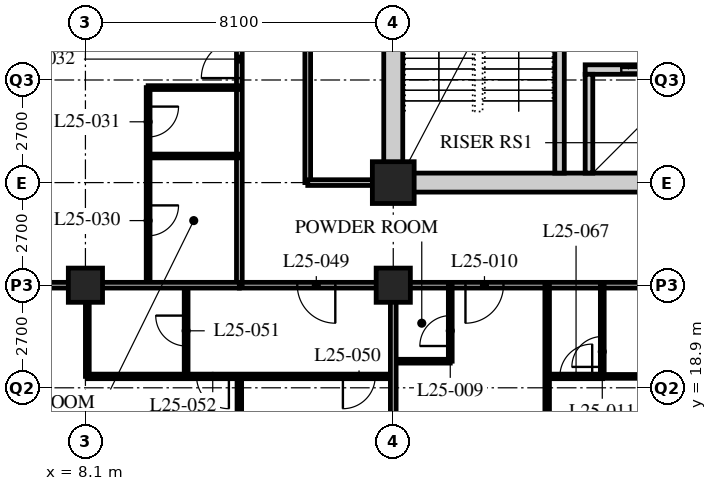
"""IFC4 building model, lengths in metres.
Left out: names, types, materials, properties, quantities, classifications, styles, units other than length and angle.
Written with IfcOpenShell. Run it as: python <this file> out.ifc"""

import sys

from ifc_helpers import new_model, si_unit, direction, frame, frame_2d, origin, origin_2d, place, context, subcontext, project, spatial, rectangle, hollow_rectangle, extrude, element, fill, save


model = new_model("IFC4")
c1 = context("Model", 3, precision=1e-05, world=origin(), true_north=direction((0.0, 1.0)))
c2 = subcontext(c1, "Body", "Model", "MODEL_VIEW")
j1 = project(units=[si_unit("LENGTHUNIT", "METRE"), si_unit("PLANEANGLEUNIT", "RADIAN")], contexts=[c1])
p1 = place(None, origin())
s1 = spatial("IfcSite", under=j1, at=p1, CompositionType="ELEMENT")
p2 = place(p1, origin())
s2 = spatial("IfcBuilding", under=s1, at=p2, CompositionType="ELEMENT")
p3 = place(p2, frame((0.0, 0.0, 103.4)))
s3 = spatial("IfcBuildingStorey", under=s2, at=p3, CompositionType="ELEMENT", Elevation=103.4)
for number, where, z_axis, x_axis in (
    (1, (8.1, 21.6, 0.0), (0.0, 0.0, 1.0), (1.0, 0.0, 0.0)),
    (2, (16.2, 21.6, 0.0), (0.0, 0.0, 1.0), (1.0, 0.0, 0.0)),
):
    element("IfcColumn", number, at=place(p3, frame(where, z_axis=z_axis, x_axis=x_axis)), inside=s3, PredefinedType="COLUMN", context=c2, shape_type="SweptSolid", body=[
        extrude(hollow_rectangle(XDim=0.9, YDim=0.9, WallThickness=0.1, at=origin_2d()), origin(), (0.0, 0.0, 1.0), 3.4),
    ])
p4 = place(p3, frame((16.2, 24.3, 0.0), z_axis=(0.0, 0.0, 1.0), x_axis=(1.0, 0.0, 0.0)))
e3 = element("IfcColumn", 3, at=p4, inside=s3, PredefinedType="COLUMN", context=c2, shape_type="SweptSolid", body=[
    extrude(hollow_rectangle(XDim=1.1, YDim=1.1, WallThickness=0.1, at=origin_2d()), origin(), (0.0, 0.0, 1.0), 3.4),
])
p5 = place(p3, frame((12.15, 21.6, 0.0), z_axis=(0.0, 0.0, 1.0), x_axis=(1.0, 0.0, 0.0)))
e4 = element("IfcWall", 4, at=p5, inside=s3, PredefinedType="PARTITIONING", context=c2, shape_type="SweptSolid", body=[
    extrude(rectangle(XDim=32.4, YDim=0.15, at=frame_2d((16.2, 0.0))), origin(), (0.0, 0.0, 1.0), 2.578),
])
p6 = place(p5, frame((5.95, 0.0, 0.0)))
e5 = element("IfcOpeningElement", 5, at=p6, cuts=e4, PredefinedType="OPENING", context=c2, shape_type="SweptSolid", body=[
    extrude(rectangle(XDim=1.0, YDim=2.1, at=frame_2d((0.5, 1.05))), frame((0.0, 0.085, 0.0), z_axis=(0.0, -1.0, 0.0), x_axis=(1.0, 0.0, 0.0)), (0.0, 0.0, 1.0), 0.17),
])
p7 = place(p5, frame((14.05, 0.0, 0.0)))
e6 = element("IfcOpeningElement", 6, at=p7, cuts=e4, PredefinedType="OPENING", context=c2, shape_type="SweptSolid", body=[
    extrude(rectangle(XDim=1.0, YDim=2.1, at=frame_2d((0.5, 1.05))), frame((0.0, 0.085, 0.0), z_axis=(0.0, -1.0, 0.0), x_axis=(1.0, 0.0, 0.0)), (0.0, 0.0, 1.0), 0.17),
])
p8 = place(p5, frame((22.15, 0.0, 0.0)))
e7 = element("IfcOpeningElement", 7, at=p8, cuts=e4, PredefinedType="OPENING", context=c2, shape_type="SweptSolid", body=[
    extrude(rectangle(XDim=1.0, YDim=2.1, at=frame_2d((0.5, 1.05))), frame((0.0, 0.085, 0.0), z_axis=(0.0, -1.0, 0.0), x_axis=(1.0, 0.0, 0.0)), (0.0, 0.0, 1.0), 0.17),
])
p9 = place(p5, frame((1.525, 0.0, 0.0)))
e8 = element("IfcOpeningElement", 8, at=p9, cuts=e4, PredefinedType="OPENING", context=c2, shape_type="SweptSolid", body=[
    extrude(rectangle(XDim=1.0, YDim=2.1, at=frame_2d((0.5, 1.05))), frame((0.0, 0.085, 0.0), z_axis=(0.0, -1.0, 0.0), x_axis=(1.0, 0.0, 0.0)), (0.0, 0.0, 1.0), 0.17),
])
p10 = place(p5, frame((29.875, 0.0, 0.0)))
e9 = element("IfcOpeningElement", 9, at=p10, cuts=e4, PredefinedType="OPENING", context=c2, shape_type="SweptSolid", body=[
    extrude(rectangle(XDim=1.0, YDim=2.1, at=frame_2d((0.5, 1.05))), frame((0.0, 0.085, 0.0), z_axis=(0.0, -1.0, 0.0), x_axis=(1.0, 0.0, 0.0)), (0.0, 0.0, 1.0), 0.17),
])
p11 = place(p3, frame((12.15, 21.6, 0.0), z_axis=(0.0, 0.0, 1.0), x_axis=(0.0, 1.0, 0.0)))
e10 = element("IfcWall", 10, at=p11, inside=s3, PredefinedType="PARTITIONING", context=c2, shape_type="SweptSolid", body=[
    extrude(rectangle(XDim=24.3, YDim=0.15, at=frame_2d((12.15, 0.0))), origin(), (0.0, 0.0, 1.0), 3.19),
])
p12 = place(p11, frame((5.45, 0.0, 0.0)))
e11 = element("IfcOpeningElement", 11, at=p12, cuts=e10, PredefinedType="OPENING", context=c2, shape_type="SweptSolid", body=[
    extrude(rectangle(XDim=1.0, YDim=2.1, at=frame_2d((0.5, 1.05))), frame((0.0, 0.085, 0.0), z_axis=(0.0, -1.0, 0.0), x_axis=(1.0, 0.0, 0.0)), (0.0, 0.0, 1.0), 0.17),
])
p13 = place(p11, frame((13.55, 0.0, 0.0)))
e12 = element("IfcOpeningElement", 12, at=p13, cuts=e10, PredefinedType="OPENING", context=c2, shape_type="SweptSolid", body=[
    extrude(rectangle(XDim=1.0, YDim=2.1, at=frame_2d((0.5, 1.05))), frame((0.0, 0.085, 0.0), z_axis=(0.0, -1.0, 0.0), x_axis=(1.0, 0.0, 0.0)), (0.0, 0.0, 1.0), 0.17),
])
p14 = place(p11, frame((21.65, 0.0, 0.0)))
e13 = element("IfcOpeningElement", 13, at=p14, cuts=e10, PredefinedType="OPENING", context=c2, shape_type="SweptSolid", body=[
    extrude(rectangle(XDim=1.0, YDim=2.1, at=frame_2d((0.5, 1.05))), frame((0.0, 0.085, 0.0), z_axis=(0.0, -1.0, 0.0), x_axis=(1.0, 0.0, 0.0)), (0.0, 0.0, 1.0), 0.17),
])
p15 = place(p3, frame((13.95, 44.1, 0.0), z_axis=(0.0, 0.0, 1.0), x_axis=(0.0, -1.0, 0.0)))
e14 = element("IfcWall", 14, at=p15, inside=s3, PredefinedType="PARTITIONING", context=c2, shape_type="SweptSolid", body=[
    extrude(rectangle(XDim=19.8, YDim=0.15, at=frame_2d((9.9, 0.0))), origin(), (0.0, 0.0, 1.0), 3.19),
])
p16 = place(p15, frame((15.25, 0.0, 0.0)))
e15 = element("IfcOpeningElement", 15, at=p16, cuts=e14, PredefinedType="OPENING", context=c2, shape_type="SweptSolid", body=[
    extrude(rectangle(XDim=1.0, YDim=2.1, at=frame_2d((0.5, 1.05))), frame((0.0, 0.085, 0.0), z_axis=(0.0, -1.0, 0.0), x_axis=(1.0, 0.0, 0.0)), (0.0, 0.0, 1.0), 0.17),
])
p17 = place(p15, frame((7.15, 0.0, 0.0)))
e16 = element("IfcOpeningElement", 16, at=p17, cuts=e14, PredefinedType="OPENING", context=c2, shape_type="SweptSolid", body=[
    extrude(rectangle(XDim=1.0, YDim=2.1, at=frame_2d((0.5, 1.05))), frame((0.0, 0.085, 0.0), z_axis=(0.0, -1.0, 0.0), x_axis=(1.0, 0.0, 0.0)), (0.0, 0.0, 1.0), 0.17),
])
p18 = place(p3, frame((13.95, 24.3, 0.0), z_axis=(0.0, 0.0, 1.0), x_axis=(1.0, 0.0, 0.0)))
e17 = element("IfcWall", 17, at=p18, inside=s3, PredefinedType="PARTITIONING", context=c2, shape_type="SweptSolid", body=[
    extrude(rectangle(XDim=2.05, YDim=0.15, at=frame_2d((1.025, 0.0))), origin(), (0.0, 0.0, 1.0), 3.19),
])
p19 = place(p3, frame((16.2, 19.6, 0.0), z_axis=(0.0, 0.0, 1.0), x_axis=(1.0, 0.0, 0.0)))
e18 = element("IfcWall", 18, at=p19, inside=s3, PredefinedType="PARTITIONING", context=c2, shape_type="SweptSolid", body=[
    extrude(rectangle(XDim=1.5, YDim=0.1, at=frame_2d((0.75, 0.0))), origin(), (0.0, 0.0, 1.0), 3.19),
])
p20 = place(p3, frame((17.7, 21.6, 0.0), z_axis=(0.0, 0.0, 1.0), x_axis=(0.0, -1.0, 0.0)))
e19 = element("IfcWall", 19, at=p20, inside=s3, PredefinedType="PARTITIONING", context=c2, shape_type="SweptSolid", body=[
    extrude(rectangle(XDim=2.0, YDim=0.1, at=frame_2d((1.0, 0.0))), origin(), (0.0, 0.0, 1.0), 3.19),
])
p21 = place(p20, frame((0.8, 0.0, 0.0)))
e20 = element("IfcOpeningElement", 20, at=p21, cuts=e19, PredefinedType="OPENING", context=c2, shape_type="SweptSolid", body=[
    extrude(rectangle(XDim=0.8, YDim=2.1, at=frame_2d((0.4, 1.05))), frame((0.0, 0.06, 0.0), z_axis=(0.0, -1.0, 0.0), x_axis=(1.0, 0.0, 0.0)), (0.0, 0.0, 1.0), 0.12),
])
p22 = place(p3, frame((21.7, 19.2, 0.0), z_axis=(0.0, 0.0, 1.0), x_axis=(1.0, 0.0, 0.0)))
e21 = element("IfcWall", 21, at=p22, inside=s3, PredefinedType="PARTITIONING", context=c2, shape_type="SweptSolid", body=[
    extrude(rectangle(XDim=2.6, YDim=0.1, at=frame_2d((1.3, 0.0))), origin(), (0.0, 0.0, 1.0), 3.19),
])
p23 = place(p3, frame((21.7, 21.6, 0.0), z_axis=(0.0, 0.0, 1.0), x_axis=(0.0, -1.0, 0.0)))
e22 = element("IfcWall", 22, at=p23, inside=s3, PredefinedType="PARTITIONING", context=c2, shape_type="SweptSolid", body=[
    extrude(rectangle(XDim=2.4, YDim=0.1, at=frame_2d((1.2, 0.0))), origin(), (0.0, 0.0, 1.0), 3.19),
])
p24 = place(p23, frame((1.35, 0.0, 0.0)))
e23 = element("IfcOpeningElement", 23, at=p24, cuts=e22, PredefinedType="OPENING", context=c2, shape_type="SweptSolid", body=[
    extrude(rectangle(XDim=0.8, YDim=2.1, at=frame_2d((0.4, 1.05))), frame((0.0, 0.06, 0.0), z_axis=(0.0, -1.0, 0.0), x_axis=(1.0, 0.0, 0.0)), (0.0, 0.0, 1.0), 0.12),
])
p25 = place(p3, frame((20.25, 21.6, 0.0), z_axis=(0.0, 0.0, 1.0), x_axis=(0.0, -1.0, 0.0)))
e24 = element("IfcWall", 24, at=p25, inside=s3, PredefinedType="PARTITIONING", context=c2, shape_type="SweptSolid", body=[
    extrude(rectangle(XDim=15.9, YDim=0.12, at=frame_2d((7.95, 0.0))), origin(), (0.0, 0.0, 1.0), 3.19),
])
p26 = place(p25, frame((8.875, 0.0, 0.0)))
e25 = element("IfcOpeningElement", 25, at=p26, cuts=e24, PredefinedType="OPENING", context=c2, shape_type="SweptSolid", body=[
    extrude(rectangle(XDim=0.85, YDim=2.1, at=frame_2d((0.425, 1.05))), frame((0.0, 0.07, 0.0), z_axis=(0.0, -1.0, 0.0), x_axis=(1.0, 0.0, 0.0)), (0.0, 0.0, 1.0), 0.14),
])
p27 = place(p3, frame((9.75, 21.6, 0.0), z_axis=(0.0, 0.0, 1.0), x_axis=(0.0, 1.0, 0.0)))
e26 = element("IfcWall", 26, at=p27, inside=s3, PredefinedType="PARTITIONING", context=c2, shape_type="SweptSolid", body=[
    extrude(rectangle(XDim=5.2, YDim=0.1, at=frame_2d((2.6, 0.0))), origin(), (0.0, 0.0, 1.0), 3.19),
])
p28 = place(p27, frame((1.3, 0.0, 0.0)))
e27 = element("IfcOpeningElement", 27, at=p28, cuts=e26, PredefinedType="OPENING", context=c2, shape_type="SweptSolid", body=[
    extrude(rectangle(XDim=0.8, YDim=2.1, at=frame_2d((0.4, 1.05))), frame((0.0, 0.06, 0.0), z_axis=(0.0, -1.0, 0.0), x_axis=(1.0, 0.0, 0.0)), (0.0, 0.0, 1.0), 0.12),
])
p29 = place(p27, frame((3.9, 0.0, 0.0)))
e28 = element("IfcOpeningElement", 28, at=p29, cuts=e26, PredefinedType="OPENING", context=c2, shape_type="SweptSolid", body=[
    extrude(rectangle(XDim=0.8, YDim=2.1, at=frame_2d((0.4, 1.05))), frame((0.0, 0.06, 0.0), z_axis=(0.0, -1.0, 0.0), x_axis=(1.0, 0.0, 0.0)), (0.0, 0.0, 1.0), 0.12),
])
for number, where, z_axis, x_axis in (
    (29, (12.15, 25.0, 0.0), (0.0, 0.0, 1.0), (-1.0, 0.0, 0.0)),
    (30, (12.15, 26.8, 0.0), (0.0, 0.0, 1.0), (-1.0, 0.0, 0.0)),
):
    element("IfcWall", number, at=place(p3, frame(where, z_axis=z_axis, x_axis=x_axis)), inside=s3, PredefinedType="PARTITIONING", context=c2, shape_type="SweptSolid", body=[
        extrude(rectangle(XDim=2.4, YDim=0.1, at=frame_2d((1.2, 0.0))), origin(), (0.0, 0.0, 1.0), 3.19),
    ])
p30 = place(p3, frame((10.75, 21.6, 0.0), z_axis=(0.0, 0.0, 1.0), x_axis=(0.0, -1.0, 0.0)))
e31 = element("IfcWall", 31, at=p30, inside=s3, PredefinedType="PARTITIONING", context=c2, shape_type="SweptSolid", body=[
    extrude(rectangle(XDim=2.4, YDim=0.1, at=frame_2d((1.2, 0.0))), origin(), (0.0, 0.0, 1.0), 3.19),
])
p31 = place(p30, frame((0.8, 0.0, 0.0)))
e32 = element("IfcOpeningElement", 32, at=p31, cuts=e31, PredefinedType="OPENING", context=c2, shape_type="SweptSolid", body=[
    extrude(rectangle(XDim=0.8, YDim=2.1, at=frame_2d((0.4, 1.05))), frame((0.0, 0.06, 0.0), z_axis=(0.0, -1.0, 0.0), x_axis=(1.0, 0.0, 0.0)), (0.0, 0.0, 1.0), 0.12),
])
p32 = place(p3, frame((8.15, 21.6, 0.0), z_axis=(0.0, 0.0, 1.0), x_axis=(0.0, -1.0, 0.0)))
e33 = element("IfcWall", 33, at=p32, inside=s3, PredefinedType="PARTITIONING", context=c2, shape_type="SweptSolid", body=[
    extrude(rectangle(XDim=2.4, YDim=0.1, at=frame_2d((1.2, 0.0))), origin(), (0.0, 0.0, 1.0), 2.578),
])
p33 = place(p3, frame((8.15, 19.2, 0.0), z_axis=(0.0, 0.0, 1.0), x_axis=(1.0, 0.0, 0.0)))
e34 = element("IfcWall", 34, at=p33, inside=s3, PredefinedType="PARTITIONING", context=c2, shape_type="SweptSolid", body=[
    extrude(rectangle(XDim=8.05, YDim=0.12, at=frame_2d((4.025, 0.0))), origin(), (0.0, 0.0, 1.0), 3.19),
])
p34 = place(p33, frame((6.725, 0.0, 0.0)))
e35 = element("IfcOpeningElement", 35, at=p34, cuts=e34, PredefinedType="OPENING", context=c2, shape_type="SweptSolid", body=[
    extrude(rectangle(XDim=0.85, YDim=2.1, at=frame_2d((0.425, 1.05))), frame((0.0, 0.07, 0.0), z_axis=(0.0, -1.0, 0.0), x_axis=(1.0, 0.0, 0.0)), (0.0, 0.0, 1.0), 0.14),
])
p35 = place(p33, frame((2.875, 0.0, 0.0)))
e36 = element("IfcOpeningElement", 36, at=p35, cuts=e34, PredefinedType="OPENING", context=c2, shape_type="SweptSolid", body=[
    extrude(rectangle(XDim=0.85, YDim=2.1, at=frame_2d((0.425, 1.05))), frame((0.0, 0.07, 0.0), z_axis=(0.0, -1.0, 0.0), x_axis=(1.0, 0.0, 0.0)), (0.0, 0.0, 1.0), 0.14),
])
p36 = place(p3, frame((12.15, 19.2, 0.0), z_axis=(0.0, 0.0, 1.0), x_axis=(0.0, -1.0, 0.0)))
e37 = element("IfcWall", 37, at=p36, inside=s3, PredefinedType="PARTITIONING", context=c2, shape_type="SweptSolid", body=[
    extrude(rectangle(XDim=13.5, YDim=0.12, at=frame_2d((6.75, 0.0))), origin(), (0.0, 0.0, 1.0), 3.19),
])
p37 = place(p3, frame((0.3, 21.6, 0.0), z_axis=(0.0, 0.0, 1.0), x_axis=(1.0, 0.0, 0.0)))
e38 = element("IfcWall", 38, at=p37, inside=s3, PredefinedType="PARTITIONING", context=c2, shape_type="SweptSolid", body=[
    extrude(rectangle(XDim=11.85, YDim=0.15, at=frame_2d((5.925, 0.0))), origin(), (0.0, 0.0, 1.0), 2.578),
])
p38 = place(p3, frame((16.2, 21.6, 0.0), z_axis=(0.0, 0.0, 1.0), x_axis=(0.0, -1.0, 0.0)))
e39 = element("IfcWall", 39, at=p38, inside=s3, PredefinedType="PARTITIONING", context=c2, shape_type="SweptSolid", body=[
    extrude(rectangle(XDim=15.9, YDim=0.15, at=frame_2d((7.95, 0.0))), origin(), (0.0, 0.0, 1.0), 2.578),
])
p39 = place(p3, frame((21.71, 19.2, 0.0), z_axis=(0.0, 0.0, 1.0), x_axis=(-1.0, 0.0, 0.0)))
e40 = element("IfcWall", 40, at=p39, inside=s3, PredefinedType="PARTITIONING", context=c2, shape_type="SweptSolid", body=[
    extrude(rectangle(XDim=1.46, YDim=0.12, at=frame_2d((0.73, 0.0))), origin(), (0.0, 0.0, 1.0), 3.19),
])
p40 = place(p39, frame((0.275, 0.0, 0.0)))
e41 = element("IfcOpeningElement", 41, at=p40, cuts=e40, PredefinedType="OPENING", context=c2, shape_type="SweptSolid", body=[
    extrude(rectangle(XDim=0.85, YDim=2.1, at=frame_2d((0.425, 1.05))), frame((0.0, 0.07, 0.0), z_axis=(0.0, -1.0, 0.0), x_axis=(1.0, 0.0, 0.0)), (0.0, 0.0, 1.0), 0.14),
])
p41 = place(p3, frame((15.95, 24.3, 0.0), z_axis=(0.0, 0.0, 1.0), x_axis=(1.0, 0.0, 0.0)))
e42 = element("IfcWall", 42, at=p41, inside=s3, PredefinedType="SOLIDWALL", context=c2, shape_type="SweptSolid", body=[
    extrude(rectangle(XDim=24.8, YDim=0.5, at=frame_2d((12.4, 0.0))), origin(), (0.0, 0.0, 1.0), 2.54),
])
p42 = place(p41, frame((11.5, 0.0, 0.0)))
e43 = element("IfcOpeningElement", 43, at=p42, cuts=e42, PredefinedType="OPENING", context=c2, shape_type="SweptSolid", body=[
    extrude(rectangle(XDim=1.8, YDim=2.4, at=frame_2d((0.9, 1.2))), frame((0.0, 0.26, 0.0), z_axis=(0.0, -1.0, 0.0), x_axis=(1.0, 0.0, 0.0)), (0.0, 0.0, 1.0), 0.52),
])
p43 = place(p3, frame((16.2, 24.55, 0.0), z_axis=(0.0, 0.0, 1.0), x_axis=(0.0, 1.0, 0.0)))
e44 = element("IfcWall", 44, at=p43, inside=s3, PredefinedType="SOLIDWALL", context=c2, shape_type="SweptSolid", body=[
    extrude(rectangle(XDim=15.7, YDim=0.5, at=frame_2d((7.85, 0.0))), origin(), (0.0, 0.0, 1.0), 2.578),
])
p44 = place(p3, frame((20.575, 24.55, 0.0), z_axis=(0.0, 0.0, 1.0), x_axis=(0.0, 1.0, 0.0)))
e45 = element("IfcWall", 45, at=p44, inside=s3, PredefinedType="SOLIDWALL", context=c2, shape_type="SweptSolid", body=[
    extrude(rectangle(XDim=7.75, YDim=0.25, at=frame_2d((3.875, 0.0))), origin(), (0.0, 0.0, 1.0), 3.19),
])
p45 = place(p44, frame((6.2, 0.0, 0.0)))
e46 = element("IfcOpeningElement", 46, at=p45, cuts=e45, PredefinedType="OPENING", context=c2, shape_type="SweptSolid", body=[
    extrude(rectangle(XDim=1.2, YDim=2.1, at=frame_2d((0.6, 1.05))), frame((0.0, 0.135, 0.0), z_axis=(0.0, -1.0, 0.0), x_axis=(1.0, 0.0, 0.0)), (0.0, 0.0, 1.0), 0.27),
])
p46 = place(p3, frame((21.25, 27.275, 0.0), z_axis=(0.0, 0.0, 1.0), x_axis=(1.0, 0.0, 0.0)))
e47 = element("IfcWall", 47, at=p46, inside=s3, PredefinedType="SOLIDWALL", context=c2, shape_type="SweptSolid", body=[
    extrude(rectangle(XDim=2.95, YDim=0.25, at=frame_2d((1.475, 0.0))), origin(), (0.0, 0.0, 1.0), 3.19),
])
p47 = place(p46, frame((0.95, 0.0, 0.0)))
e48 = element("IfcOpeningElement", 48, at=p47, cuts=e47, PredefinedType="OPENING", context=c2, shape_type="SweptSolid", body=[
    extrude(rectangle(XDim=1.1, YDim=2.4, at=frame_2d((0.55, 1.2))), frame((0.0, 0.135, 0.0), z_axis=(0.0, -1.0, 0.0), x_axis=(1.0, 0.0, 0.0)), (0.0, 0.0, 1.0), 0.27),
])
p48 = place(p3, frame((21.35, 24.55, 0.0), z_axis=(0.0, 0.0, 1.0), x_axis=(0.0, 1.0, 0.0)))
e49 = element("IfcWall", 49, at=p48, inside=s3, PredefinedType="SOLIDWALL", context=c2, shape_type="SweptSolid", body=[
    extrude(rectangle(XDim=2.6, YDim=0.2, at=frame_2d((1.3, 0.0))), origin(), (0.0, 0.0, 1.0), 3.19),
])
p49 = place(p21, origin())
e50 = element("IfcDoor", 50, at=p49, inside=s3, OperationType="SINGLE_SWING_LEFT", PredefinedType="DOOR", context=c2, shape_type="SweptSolid", body=[
    extrude(rectangle(XDim=0.8, YDim=2.1, at=frame_2d((0.4, 1.05))), frame((0.0, 0.025, 0.0), z_axis=(0.0, -1.0, 0.0), x_axis=(1.0, 0.0, 0.0)), (0.0, 0.0, 1.0), 0.05),
])
fill(e20, e50)
p50 = place(p6, origin())
e51 = element("IfcDoor", 51, at=p50, inside=s3, OperationType="SINGLE_SWING_RIGHT", PredefinedType="DOOR", context=c2, shape_type="SweptSolid", body=[
    extrude(rectangle(XDim=1.0, YDim=2.1, at=frame_2d((0.5, 1.05))), frame((0.0, 0.025, 0.0), z_axis=(0.0, -1.0, 0.0), x_axis=(1.0, 0.0, 0.0)), (0.0, 0.0, 1.0), 0.05),
])
fill(e5, e51)
p51 = place(p24, origin())
e52 = element("IfcDoor", 52, at=p51, inside=s3, OperationType="SINGLE_SWING_LEFT", PredefinedType="DOOR", context=c2, shape_type="SweptSolid", body=[
    extrude(rectangle(XDim=0.8, YDim=2.1, at=frame_2d((0.4, 1.05))), frame((0.0, 0.025, 0.0), z_axis=(0.0, -1.0, 0.0), x_axis=(1.0, 0.0, 0.0)), (0.0, 0.0, 1.0), 0.05),
])
fill(e23, e52)
p52 = place(p28, origin())
e53 = element("IfcDoor", 53, at=p52, inside=s3, OperationType="SINGLE_SWING_LEFT", PredefinedType="DOOR", context=c2, shape_type="SweptSolid", body=[
    extrude(rectangle(XDim=0.8, YDim=2.1, at=frame_2d((0.4, 1.05))), frame((0.0, 0.025, 0.0), z_axis=(0.0, -1.0, 0.0), x_axis=(1.0, 0.0, 0.0)), (0.0, 0.0, 1.0), 0.05),
])
fill(e27, e53)
p53 = place(p29, origin())
e54 = element("IfcDoor", 54, at=p53, inside=s3, OperationType="SINGLE_SWING_LEFT", PredefinedType="DOOR", context=c2, shape_type="SweptSolid", body=[
    extrude(rectangle(XDim=0.8, YDim=2.1, at=frame_2d((0.4, 1.05))), frame((0.0, 0.025, 0.0), z_axis=(0.0, -1.0, 0.0), x_axis=(1.0, 0.0, 0.0)), (0.0, 0.0, 1.0), 0.05),
])
fill(e28, e54)
p54 = place(p12, origin())
e55 = element("IfcDoor", 55, at=p54, inside=s3, OperationType="SINGLE_SWING_LEFT", PredefinedType="DOOR", context=c2, shape_type="SweptSolid", body=[
    extrude(rectangle(XDim=1.0, YDim=2.1, at=frame_2d((0.5, 1.05))), frame((0.0, 0.025, 0.0), z_axis=(0.0, -1.0, 0.0), x_axis=(1.0, 0.0, 0.0)), (0.0, 0.0, 1.0), 0.05),
])
fill(e11, e55)
p55 = place(p9, origin())
e56 = element("IfcDoor", 56, at=p55, inside=s3, OperationType="SINGLE_SWING_LEFT", PredefinedType="DOOR", context=c2, shape_type="SweptSolid", body=[
    extrude(rectangle(XDim=1.0, YDim=2.1, at=frame_2d((0.5, 1.05))), frame((0.0, 0.025, 0.0), z_axis=(0.0, -1.0, 0.0), x_axis=(1.0, 0.0, 0.0)), (0.0, 0.0, 1.0), 0.05),
])
fill(e8, e56)
p56 = place(p34, origin())
e57 = element("IfcDoor", 57, at=p56, inside=s3, OperationType="SINGLE_SWING_RIGHT", PredefinedType="DOOR", context=c2, shape_type="SweptSolid", body=[
    extrude(rectangle(XDim=0.85, YDim=2.1, at=frame_2d((0.425, 1.05))), frame((0.0, 0.025, 0.0), z_axis=(0.0, -1.0, 0.0), x_axis=(1.0, 0.0, 0.0)), (0.0, 0.0, 1.0), 0.05),
])
fill(e35, e57)
p57 = place(p31, origin())
e58 = element("IfcDoor", 58, at=p57, inside=s3, OperationType="SINGLE_SWING_RIGHT", PredefinedType="DOOR", context=c2, shape_type="SweptSolid", body=[
    extrude(rectangle(XDim=0.8, YDim=2.1, at=frame_2d((0.4, 1.05))), frame((0.0, 0.025, 0.0), z_axis=(0.0, -1.0, 0.0), x_axis=(1.0, 0.0, 0.0)), (0.0, 0.0, 1.0), 0.05),
])
fill(e32, e58)
p58 = place(p35, origin())
e59 = element("IfcDoor", 59, at=p58, inside=s3, OperationType="SINGLE_SWING_LEFT", PredefinedType="DOOR", context=c2, shape_type="SweptSolid", body=[
    extrude(rectangle(XDim=0.85, YDim=2.1, at=frame_2d((0.425, 1.05))), frame((0.0, 0.025, 0.0), z_axis=(0.0, -1.0, 0.0), x_axis=(1.0, 0.0, 0.0)), (0.0, 0.0, 1.0), 0.05),
])
fill(e36, e59)
p59 = place(p40, origin())
e60 = element("IfcDoor", 60, at=p59, inside=s3, OperationType="SINGLE_SWING_RIGHT", PredefinedType="DOOR", context=c2, shape_type="SweptSolid", body=[
    extrude(rectangle(XDim=0.85, YDim=2.1, at=frame_2d((0.425, 1.05))), frame((0.0, 0.025, 0.0), z_axis=(0.0, -1.0, 0.0), x_axis=(1.0, 0.0, 0.0)), (0.0, 0.0, 1.0), 0.05),
])
fill(e41, e60)
p60 = place(p47, origin())
e61 = element("IfcDoor", 61, at=p60, inside=s3, OperationType="DOUBLE_DOOR_SLIDING", PredefinedType="DOOR", context=c2, shape_type="SweptSolid", body=[
    extrude(rectangle(XDim=1.1, YDim=2.4, at=frame_2d((0.55, 1.2))), frame((0.0, 0.025, 0.0), z_axis=(0.0, -1.0, 0.0), x_axis=(1.0, 0.0, 0.0)), (0.0, 0.0, 1.0), 0.05),
])
fill(e48, e61)
save(model, sys.argv[1])
